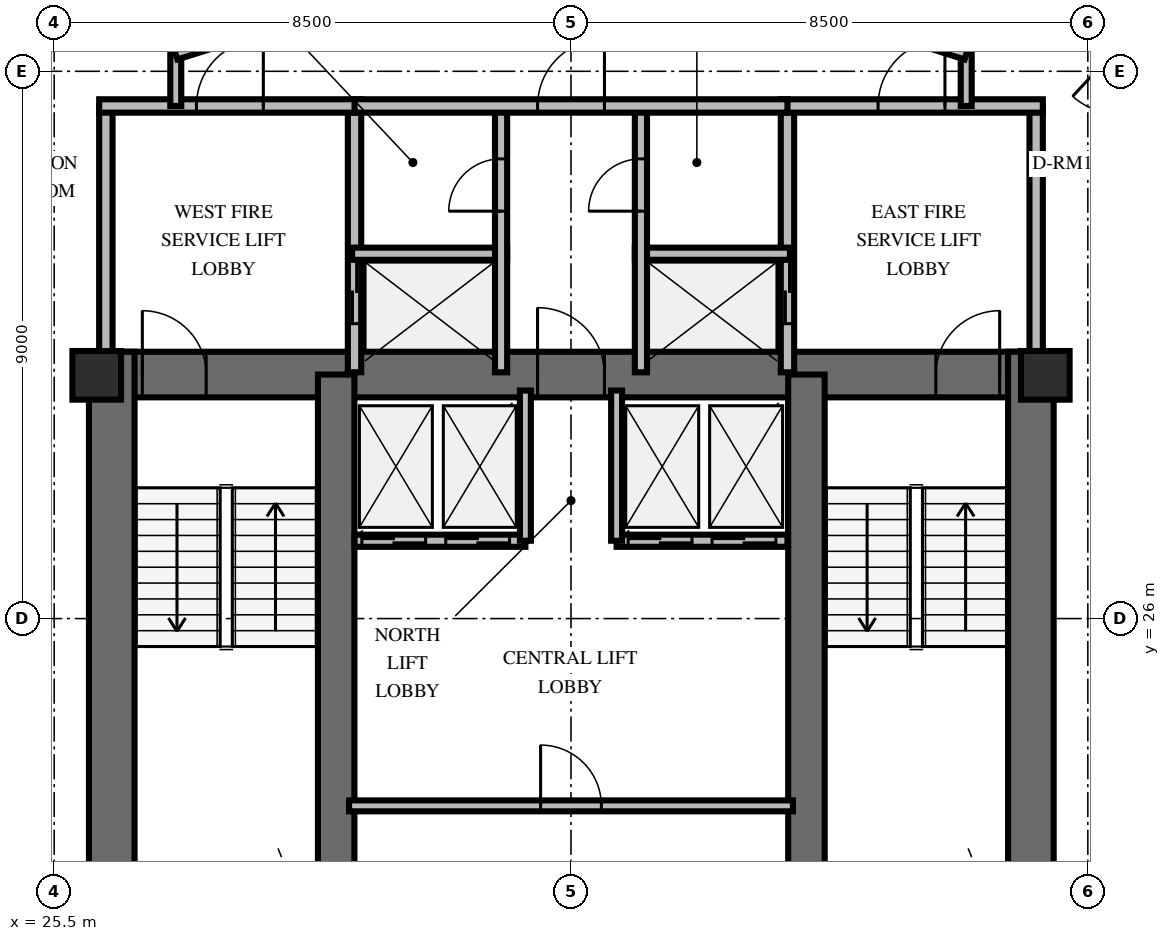
"""IFC4 building model, lengths in metres.
Left out: names, types, materials, properties, quantities, classifications, styles, units other than length and angle.
Written with IfcOpenShell. Run it as: python <this file> out.ifc"""

import sys

from ifc_helpers import new_model, si_unit, direction, frame, frame_2d, origin, origin_2d, place, context, subcontext, project, spatial, rectangle, extrude, element, fill, save


model = new_model("IFC4")
c1 = context("Model", 3, precision=1e-05, world=origin(), true_north=direction((0.0, 1.0)))
c2 = subcontext(c1, "Body", "Model", "MODEL_VIEW")
j1 = project(units=[si_unit("LENGTHUNIT", "METRE"), si_unit("PLANEANGLEUNIT", "RADIAN")], contexts=[c1])
p1 = place(None, origin())
s1 = spatial("IfcSite", under=j1, at=p1, CompositionType="ELEMENT")
p2 = place(p1, origin())
s2 = spatial("IfcBuilding", under=s1, at=p2, CompositionType="ELEMENT")
p3 = place(p2, frame((0.0, 0.0, 184.4)))
s3 = spatial("IfcBuildingStorey", under=s2, at=p3, CompositionType="ELEMENT", Elevation=184.4)
p4 = place(p3, frame((26.072, 30.013, 0.0), z_axis=(0.0, 0.0, 1.0), x_axis=(1.0, 0.0, 0.0)))
e1 = element("IfcWall", 1, at=p4, inside=s3, PredefinedType="SHEAR", context=c2, shape_type="SweptSolid", body=[
    extrude(rectangle(XDim=15.866, YDim=0.75, at=frame_2d((7.933, 0.0))), origin(), (0.0, 0.0, 1.0), 3.6),
])
p5 = place(p4, frame((0.878, 0.0, 0.0)))
e2 = element("IfcOpeningElement", 2, at=p5, cuts=e1, PredefinedType="OPENING", context=c2, shape_type="SweptSolid", body=[
    extrude(rectangle(XDim=1.05, YDim=2.15, at=frame_2d((0.525, 1.075))), frame((0.0, 0.385, 0.0), z_axis=(0.0, -1.0, 0.0), x_axis=(1.0, 0.0, 0.0)), (0.0, 0.0, 1.0), 0.77),
])
p6 = place(p4, frame((13.928, 0.0, 0.0)))
e3 = element("IfcOpeningElement", 3, at=p6, cuts=e1, PredefinedType="OPENING", context=c2, shape_type="SweptSolid", body=[
    extrude(rectangle(XDim=1.05, YDim=2.15, at=frame_2d((0.525, 1.075))), frame((0.0, 0.385, 0.0), z_axis=(0.0, -1.0, 0.0), x_axis=(1.0, 0.0, 0.0)), (0.0, 0.0, 1.0), 0.77),
])
p7 = place(p4, frame((7.378, 0.0, 0.0)))
e4 = element("IfcOpeningElement", 4, at=p7, cuts=e1, PredefinedType="OPENING", context=c2, shape_type="SweptSolid", body=[
    extrude(rectangle(XDim=1.1, YDim=2.15, at=frame_2d((0.55, 1.075))), frame((0.0, 0.385, 0.0), z_axis=(0.0, -1.0, 0.0), x_axis=(1.0, 0.0, 0.0)), (0.0, 0.0, 1.0), 0.77),
])
for number, where, z_axis, x_axis in (
    (5, (26.447, 19.812, 0.0), (0.0, 0.0, 1.0), (0.0, 1.0, 0.0)),
    (6, (41.563, 19.812, 0.0), (0.0, 0.0, 1.0), (0.0, 1.0, 0.0)),
):
    element("IfcWall", number, at=place(p3, frame(where, z_axis=z_axis, x_axis=x_axis)), inside=s3, PredefinedType="SHEAR", context=c2, shape_type="SweptSolid", body=[
        extrude(rectangle(XDim=10.576, YDim=0.75, at=frame_2d((5.288, 0.0))), origin(), (0.0, 0.0, 1.0), 3.6),
    ])
for number, where, z_axis, x_axis in (
    (7, (30.138, 20.187, 0.0), (0.0, 0.0, 1.0), (0.0, 1.0, 0.0)),
    (8, (37.872, 20.187, 0.0), (0.0, 0.0, 1.0), (0.0, 1.0, 0.0)),
):
    element("IfcWall", number, at=place(p3, frame(where, z_axis=z_axis, x_axis=x_axis)), inside=s3, PredefinedType="SHEAR", context=c2, shape_type="SweptSolid", body=[
        extrude(rectangle(XDim=9.826, YDim=0.6, at=frame_2d((4.913, 0.0))), origin(), (0.0, 0.0, 1.0), 3.6),
    ])
for number, where, z_axis, x_axis in (
    (9, (26.2, 30.0, 0.0), (0.0, 0.0, 1.0), (1.0, 0.0, 0.0)),
    (10, (41.8, 30.0, 0.0), (0.0, 0.0, 1.0), (1.0, 0.0, 0.0)),
):
    element("IfcColumn", number, at=place(p3, frame(where, z_axis=z_axis, x_axis=x_axis)), inside=s3, PredefinedType="PILASTER", context=c2, shape_type="SweptSolid", body=[
        extrude(rectangle(XDim=0.8, YDim=0.8, at=origin_2d()), origin(), (0.0, 0.0, 1.0), 3.6),
    ])
p8 = place(p3, frame((26.35, 30.05, 0.0), z_axis=(0.0, 0.0, 1.0), x_axis=(0.0, 1.0, 0.0)))
e11 = element("IfcWall", 11, at=p8, inside=s3, PredefinedType="SOLIDWALL", context=c2, shape_type="SweptSolid", body=[
    extrude(rectangle(XDim=4.38, YDim=0.22, at=frame_2d((2.19, 0.0))), origin(), (0.0, 0.0, 1.0), 2.46),
])
p9 = place(p3, frame((30.44, 30.05, 0.0), z_axis=(0.0, 0.0, 1.0), x_axis=(0.0, 1.0, 0.0)))
e12 = element("IfcWall", 12, at=p9, inside=s3, PredefinedType="SOLIDWALL", context=c2, shape_type="SweptSolid", body=[
    extrude(rectangle(XDim=4.38, YDim=0.22, at=frame_2d((2.19, 0.0))), origin(), (0.0, 0.0, 1.0), 2.46),
])
p10 = place(p9, frame((0.8, 0.0, 0.0)))
e13 = element("IfcOpeningElement", 13, at=p10, cuts=e12, PredefinedType="OPENING", context=c2, shape_type="SweptSolid", body=[
    extrude(rectangle(XDim=1.05, YDim=2.1, at=frame_2d((0.525, 1.05))), frame((0.0, 0.12, 0.0), z_axis=(0.0, -1.0, 0.0), x_axis=(1.0, 0.0, 0.0)), (0.0, 0.0, 1.0), 0.24),
])
p11 = place(p3, frame((26.24, 34.43, 0.0), z_axis=(0.0, 0.0, 1.0), x_axis=(1.0, 0.0, 0.0)))
e14 = element("IfcWall", 14, at=p11, inside=s3, PredefinedType="SOLIDWALL", context=c2, shape_type="SweptSolid", body=[
    extrude(rectangle(XDim=4.31, YDim=0.22, at=frame_2d((2.155, 0.0))), origin(), (0.0, 0.0, 1.0), 2.46),
])
p12 = place(p11, frame((1.6, 0.0, 0.0)))
e15 = element("IfcOpeningElement", 15, at=p12, cuts=e14, PredefinedType="OPENING", context=c2, shape_type="SweptSolid", body=[
    extrude(rectangle(XDim=1.1, YDim=2.15, at=frame_2d((0.55, 1.075))), frame((0.0, 0.12, 0.0), z_axis=(0.0, -1.0, 0.0), x_axis=(1.0, 0.0, 0.0)), (0.0, 0.0, 1.0), 0.24),
])
p13 = place(p3, frame((30.4, 32.0, 0.0), z_axis=(0.0, 0.0, 1.0), x_axis=(1.0, 0.0, 0.0)))
e16 = element("IfcWall", 16, at=p13, inside=s3, PredefinedType="SOLIDWALL", context=c2, shape_type="SweptSolid", body=[
    extrude(rectangle(XDim=2.55, YDim=0.2, at=frame_2d((1.275, 0.0))), origin(), (0.0, 0.0, 1.0), 2.46),
])
p14 = place(p3, frame((32.85, 30.05, 0.0), z_axis=(0.0, 0.0, 1.0), x_axis=(0.0, 1.0, 0.0)))
e17 = element("IfcWall", 17, at=p14, inside=s3, PredefinedType="SOLIDWALL", context=c2, shape_type="SweptSolid", body=[
    extrude(rectangle(XDim=4.38, YDim=0.2, at=frame_2d((2.19, 0.0))), origin(), (0.0, 0.0, 1.0), 2.46),
])
p15 = place(p14, frame((2.65, 0.0, 0.0)))
e18 = element("IfcOpeningElement", 18, at=p15, cuts=e17, PredefinedType="OPENING", context=c2, shape_type="SweptSolid", body=[
    extrude(rectangle(XDim=0.86, YDim=2.05, at=frame_2d((0.43, 1.025))), frame((0.0, 0.11, 0.0), z_axis=(0.0, -1.0, 0.0), x_axis=(1.0, 0.0, 0.0)), (0.0, 0.0, 1.0), 0.22),
])
p16 = place(p3, frame((37.56, 30.05, 0.0), z_axis=(0.0, 0.0, 1.0), x_axis=(0.0, 1.0, 0.0)))
e19 = element("IfcWall", 19, at=p16, inside=s3, PredefinedType="SOLIDWALL", context=c2, shape_type="SweptSolid", body=[
    extrude(rectangle(XDim=4.38, YDim=0.22, at=frame_2d((2.19, 0.0))), origin(), (0.0, 0.0, 1.0), 2.46),
])
p17 = place(p16, frame((0.8, 0.0, 0.0)))
e20 = element("IfcOpeningElement", 20, at=p17, cuts=e19, PredefinedType="OPENING", context=c2, shape_type="SweptSolid", body=[
    extrude(rectangle(XDim=1.05, YDim=2.1, at=frame_2d((0.525, 1.05))), frame((0.0, 0.12, 0.0), z_axis=(0.0, -1.0, 0.0), x_axis=(1.0, 0.0, 0.0)), (0.0, 0.0, 1.0), 0.24),
])
p18 = place(p3, frame((41.65, 30.05, 0.0), z_axis=(0.0, 0.0, 1.0), x_axis=(0.0, 1.0, 0.0)))
e21 = element("IfcWall", 21, at=p18, inside=s3, PredefinedType="SOLIDWALL", context=c2, shape_type="SweptSolid", body=[
    extrude(rectangle(XDim=4.38, YDim=0.22, at=frame_2d((2.19, 0.0))), origin(), (0.0, 0.0, 1.0), 2.46),
])
p19 = place(p3, frame((37.45, 34.43, 0.0), z_axis=(0.0, 0.0, 1.0), x_axis=(1.0, 0.0, 0.0)))
e22 = element("IfcWall", 22, at=p19, inside=s3, PredefinedType="SOLIDWALL", context=c2, shape_type="SweptSolid", body=[
    extrude(rectangle(XDim=4.31, YDim=0.22, at=frame_2d((2.155, 0.0))), origin(), (0.0, 0.0, 1.0), 2.46),
])
p20 = place(p19, frame((1.6, 0.0, 0.0)))
e23 = element("IfcOpeningElement", 23, at=p20, cuts=e22, PredefinedType="OPENING", context=c2, shape_type="SweptSolid", body=[
    extrude(rectangle(XDim=1.1, YDim=2.15, at=frame_2d((0.55, 1.075))), frame((0.0, 0.12, 0.0), z_axis=(0.0, -1.0, 0.0), x_axis=(1.0, 0.0, 0.0)), (0.0, 0.0, 1.0), 0.24),
])
p21 = place(p3, frame((35.05, 32.0, 0.0), z_axis=(0.0, 0.0, 1.0), x_axis=(1.0, 0.0, 0.0)))
e24 = element("IfcWall", 24, at=p21, inside=s3, PredefinedType="SOLIDWALL", context=c2, shape_type="SweptSolid", body=[
    extrude(rectangle(XDim=2.55, YDim=0.2, at=frame_2d((1.275, 0.0))), origin(), (0.0, 0.0, 1.0), 2.46),
])
p22 = place(p3, frame((35.15, 30.05, 0.0), z_axis=(0.0, 0.0, 1.0), x_axis=(0.0, 1.0, 0.0)))
e25 = element("IfcWall", 25, at=p22, inside=s3, PredefinedType="SOLIDWALL", context=c2, shape_type="SweptSolid", body=[
    extrude(rectangle(XDim=4.38, YDim=0.2, at=frame_2d((2.19, 0.0))), origin(), (0.0, 0.0, 1.0), 2.46),
])
p23 = place(p22, frame((2.65, 0.0, 0.0)))
e26 = element("IfcOpeningElement", 26, at=p23, cuts=e25, PredefinedType="OPENING", context=c2, shape_type="SweptSolid", body=[
    extrude(rectangle(XDim=0.86, YDim=2.05, at=frame_2d((0.43, 1.025))), frame((0.0, 0.11, 0.0), z_axis=(0.0, -1.0, 0.0), x_axis=(1.0, 0.0, 0.0)), (0.0, 0.0, 1.0), 0.22),
])
p24 = place(p3, frame((30.44, 34.43, 0.0), z_axis=(0.0, 0.0, 1.0), x_axis=(1.0, 0.0, 0.0)))
e27 = element("IfcWall", 27, at=p24, inside=s3, PredefinedType="SOLIDWALL", context=c2, shape_type="SweptSolid", body=[
    extrude(rectangle(XDim=7.12, YDim=0.22, at=frame_2d((3.56, 0.0))), origin(), (0.0, 0.0, 1.0), 2.46),
])
p25 = place(p24, frame((3.01, 0.0, 0.0)))
e28 = element("IfcOpeningElement", 28, at=p25, cuts=e27, PredefinedType="OPENING", context=c2, shape_type="SweptSolid", body=[
    extrude(rectangle(XDim=1.1, YDim=2.15, at=frame_2d((0.55, 1.075))), frame((0.0, 0.12, 0.0), z_axis=(0.0, -1.0, 0.0), x_axis=(1.0, 0.0, 0.0)), (0.0, 0.0, 1.0), 0.24),
])
p26 = place(p3, frame((30.35, 22.92, 0.0), z_axis=(0.0, 0.0, 1.0), x_axis=(1.0, 0.0, 0.0)))
e29 = element("IfcWall", 29, at=p26, inside=s3, PredefinedType="PARTITIONING", context=c2, shape_type="SweptSolid", body=[
    extrude(rectangle(XDim=7.3, YDim=0.18, at=frame_2d((3.65, 0.0))), origin(), (0.0, 0.0, 1.0), 2.46),
])
p27 = place(p26, frame((3.15, 0.0, 0.0)))
e30 = element("IfcOpeningElement", 30, at=p27, cuts=e29, PredefinedType="OPENING", context=c2, shape_type="SweptSolid", body=[
    extrude(rectangle(XDim=1.0, YDim=2.15, at=frame_2d((0.5, 1.075))), frame((0.0, 0.1, 0.0), z_axis=(0.0, -1.0, 0.0), x_axis=(1.0, 0.0, 0.0)), (0.0, 0.0, 1.0), 0.2),
])
p28 = place(p3, frame((30.44, 27.28, 0.0), z_axis=(0.0, 0.0, 1.0), x_axis=(1.0, 0.0, 0.0)))
e31 = element("IfcWall", 31, at=p28, inside=s3, PredefinedType="SOLIDWALL", context=c2, shape_type="SweptSolid", body=[
    extrude(rectangle(XDim=2.81, YDim=0.2, at=frame_2d((1.405, 0.0))), origin(), (0.0, 0.0, 1.0), 2.46),
])
p29 = place(p28, frame((0.12, 0.0, 0.0)))
e32 = element("IfcOpeningElement", 32, at=p29, cuts=e31, PredefinedType="OPENING", context=c2, shape_type="SweptSolid", body=[
    extrude(rectangle(XDim=1.05, YDim=2.1, at=frame_2d((0.525, 1.05))), frame((0.0, 0.11, 0.0), z_axis=(0.0, -1.0, 0.0), x_axis=(1.0, 0.0, 0.0)), (0.0, 0.0, 1.0), 0.22),
])
p30 = place(p28, frame((1.5, 0.0, 0.0)))
e33 = element("IfcOpeningElement", 33, at=p30, cuts=e31, PredefinedType="OPENING", context=c2, shape_type="SweptSolid", body=[
    extrude(rectangle(XDim=1.05, YDim=2.1, at=frame_2d((0.525, 1.05))), frame((0.0, 0.11, 0.0), z_axis=(0.0, -1.0, 0.0), x_axis=(1.0, 0.0, 0.0)), (0.0, 0.0, 1.0), 0.22),
])
p31 = place(p3, frame((33.25, 27.28, 0.0), z_axis=(0.0, 0.0, 1.0), x_axis=(0.0, 1.0, 0.0)))
e34 = element("IfcWall", 34, at=p31, inside=s3, PredefinedType="SOLIDWALL", context=c2, shape_type="SweptSolid", body=[
    extrude(rectangle(XDim=2.47, YDim=0.18, at=frame_2d((1.235, 0.0))), origin(), (0.0, 0.0, 1.0), 2.46),
])
p32 = place(p3, frame((34.75, 27.28, 0.0), z_axis=(0.0, 0.0, 1.0), x_axis=(1.0, 0.0, 0.0)))
e35 = element("IfcWall", 35, at=p32, inside=s3, PredefinedType="SOLIDWALL", context=c2, shape_type="SweptSolid", body=[
    extrude(rectangle(XDim=2.81, YDim=0.2, at=frame_2d((1.405, 0.0))), origin(), (0.0, 0.0, 1.0), 2.46),
])
p33 = place(p32, frame((0.19, 0.0, 0.0)))
e36 = element("IfcOpeningElement", 36, at=p33, cuts=e35, PredefinedType="OPENING", context=c2, shape_type="SweptSolid", body=[
    extrude(rectangle(XDim=1.05, YDim=2.1, at=frame_2d((0.525, 1.05))), frame((0.0, 0.11, 0.0), z_axis=(0.0, -1.0, 0.0), x_axis=(1.0, 0.0, 0.0)), (0.0, 0.0, 1.0), 0.22),
])
p34 = place(p32, frame((1.57, 0.0, 0.0)))
e37 = element("IfcOpeningElement", 37, at=p34, cuts=e35, PredefinedType="OPENING", context=c2, shape_type="SweptSolid", body=[
    extrude(rectangle(XDim=1.05, YDim=2.1, at=frame_2d((0.525, 1.05))), frame((0.0, 0.11, 0.0), z_axis=(0.0, -1.0, 0.0), x_axis=(1.0, 0.0, 0.0)), (0.0, 0.0, 1.0), 0.22),
])
p35 = place(p3, frame((34.75, 27.28, 0.0), z_axis=(0.0, 0.0, 1.0), x_axis=(0.0, 1.0, 0.0)))
e38 = element("IfcWall", 38, at=p35, inside=s3, PredefinedType="SOLIDWALL", context=c2, shape_type="SweptSolid", body=[
    extrude(rectangle(XDim=2.47, YDim=0.18, at=frame_2d((1.235, 0.0))), origin(), (0.0, 0.0, 1.0), 2.46),
])
for number, where, z_axis, x_axis in (
    (39, (27.5, 34.43, 0.0), (0.0, 0.0, 1.0), (0.0, 1.0, 0.0)),
    (40, (40.5, 35.28, 0.0), (0.0, 0.0, 1.0), (0.0, -1.0, 0.0)),
):
    element("IfcWall", number, at=place(p3, frame(where, z_axis=z_axis, x_axis=x_axis)), inside=s3, PredefinedType="PARTITIONING", context=c2, shape_type="SweptSolid", body=[
        extrude(rectangle(XDim=0.85, YDim=0.18, at=frame_2d((0.425, 0.0))), origin(), (0.0, 0.0, 1.0), 2.46),
    ])
p36 = place(p3, frame((27.5, 35.28, 0.0), z_axis=(0.0, 0.0, 1.0), x_axis=(0.953691418528, 0.300786765376, 0.0)))
e41 = element("IfcWall", 41, at=p36, inside=s3, PredefinedType="PARTITIONING", context=c2, shape_type="SweptSolid", body=[
    extrude(rectangle(XDim=6.816, YDim=0.18, at=frame_2d((3.408, 0.0))), origin(), (0.0, 0.0, 1.0), 2.46),
])
p37 = place(p36, frame((2.858, 0.0, 0.0)))
e42 = element("IfcOpeningElement", 42, at=p37, cuts=e41, PredefinedType="OPENING", context=c2, shape_type="SweptSolid", body=[
    extrude(rectangle(XDim=1.1, YDim=2.15, at=frame_2d((0.55, 1.075))), frame((0.0, 0.1, 0.0), z_axis=(0.0, -1.0, 0.0), x_axis=(1.0, 0.0, 0.0)), (0.0, 0.0, 1.0), 0.2),
])
p38 = place(p3, frame((34.0, 37.33, 0.0), z_axis=(0.0, 0.0, 1.0), x_axis=(0.953691418528, -0.300786765376, 0.0)))
e43 = element("IfcWall", 43, at=p38, inside=s3, PredefinedType="PARTITIONING", context=c2, shape_type="SweptSolid", body=[
    extrude(rectangle(XDim=6.816, YDim=0.18, at=frame_2d((3.408, 0.0))), origin(), (0.0, 0.0, 1.0), 2.46),
])
p39 = place(p38, frame((2.858, 0.0, 0.0)))
e44 = element("IfcOpeningElement", 44, at=p39, cuts=e43, PredefinedType="OPENING", context=c2, shape_type="SweptSolid", body=[
    extrude(rectangle(XDim=1.1, YDim=2.15, at=frame_2d((0.55, 1.075))), frame((0.0, 0.1, 0.0), z_axis=(0.0, -1.0, 0.0), x_axis=(1.0, 0.0, 0.0)), (0.0, 0.0, 1.0), 0.2),
])
p40 = place(p3, frame((44.285, 34.065, 0.0), z_axis=(0.0, 0.0, 1.0), x_axis=(-0.73251486361, 0.680751037157, 0.0)))
e45 = element("IfcWall", 45, at=p40, inside=s3, PredefinedType="PARTITIONING", context=c2, shape_type="SweptSolid", body=[
    extrude(rectangle(XDim=4.089, YDim=0.18, at=frame_2d((2.044, 0.0))), origin(), (0.0, 0.0, 1.0), 2.46),
])
p41 = place(p40, frame((0.847, 0.0, 0.0)))
e46 = element("IfcOpeningElement", 46, at=p41, cuts=e45, PredefinedType="OPENING", context=c2, shape_type="SweptSolid", body=[
    extrude(rectangle(XDim=1.0, YDim=2.15, at=frame_2d((0.5, 1.075))), frame((0.0, 0.1, 0.0), z_axis=(0.0, -1.0, 0.0), x_axis=(1.0, 0.0, 0.0)), (0.0, 0.0, 1.0), 0.2),
])
p42 = place(p3, frame((28.25, 37.737, 0.0), z_axis=(0.0, 0.0, 1.0), x_axis=(-0.807970187932, -0.589223366316, 0.0)))
e47 = element("IfcWall", 47, at=p42, inside=s3, PredefinedType="PARTITIONING", context=c2, shape_type="SweptSolid", body=[
    extrude(rectangle(XDim=4.539, YDim=0.18, at=frame_2d((2.27, 0.0))), origin(), (0.0, 0.0, 1.0), 2.46),
])
p43 = place(p5, origin())
e48 = element("IfcDoor", 48, at=p43, inside=s3, OperationType="SINGLE_SWING_LEFT", PredefinedType="DOOR", context=c2, shape_type="SweptSolid", body=[
    extrude(rectangle(XDim=1.05, YDim=2.15, at=frame_2d((0.525, 1.075))), frame((0.0, 0.025, 0.0), z_axis=(0.0, -1.0, 0.0), x_axis=(1.0, 0.0, 0.0)), (0.0, 0.0, 1.0), 0.05),
])
fill(e2, e48)
p44 = place(p6, origin())
e49 = element("IfcDoor", 49, at=p44, inside=s3, OperationType="SINGLE_SWING_RIGHT", PredefinedType="DOOR", context=c2, shape_type="SweptSolid", body=[
    extrude(rectangle(XDim=1.05, YDim=2.15, at=frame_2d((0.525, 1.075))), frame((0.0, 0.025, 0.0), z_axis=(0.0, -1.0, 0.0), x_axis=(1.0, 0.0, 0.0)), (0.0, 0.0, 1.0), 0.05),
])
fill(e3, e49)
p45 = place(p7, origin())
e50 = element("IfcDoor", 50, at=p45, inside=s3, OperationType="SINGLE_SWING_LEFT", PredefinedType="DOOR", context=c2, shape_type="SweptSolid", body=[
    extrude(rectangle(XDim=1.1, YDim=2.15, at=frame_2d((0.55, 1.075))), frame((0.0, 0.025, 0.0), z_axis=(0.0, -1.0, 0.0), x_axis=(1.0, 0.0, 0.0)), (0.0, 0.0, 1.0), 0.05),
])
fill(e4, e50)
p46 = place(p12, origin())
e51 = element("IfcDoor", 51, at=p46, inside=s3, OperationType="SINGLE_SWING_RIGHT", PredefinedType="DOOR", context=c2, shape_type="SweptSolid", body=[
    extrude(rectangle(XDim=1.1, YDim=2.15, at=frame_2d((0.55, 1.075))), frame((0.0, 0.025, 0.0), z_axis=(0.0, -1.0, 0.0), x_axis=(1.0, 0.0, 0.0)), (0.0, 0.0, 1.0), 0.05),
])
fill(e15, e51)
p47 = place(p10, origin())
e52 = element("IfcDoor", 52, at=p47, inside=s3, OperationType="DOUBLE_DOOR_SLIDING", PredefinedType="USERDEFINED", context=c2, shape_type="SweptSolid", body=[
    extrude(rectangle(XDim=1.05, YDim=2.1, at=frame_2d((0.525, 1.05))), frame((0.0, 0.025, 0.0), z_axis=(0.0, -1.0, 0.0), x_axis=(1.0, 0.0, 0.0)), (0.0, 0.0, 1.0), 0.05),
])
fill(e13, e52)
p48 = place(p15, origin())
e53 = element("IfcDoor", 53, at=p48, inside=s3, OperationType="SINGLE_SWING_LEFT", PredefinedType="TRAPDOOR", context=c2, shape_type="SweptSolid", body=[
    extrude(rectangle(XDim=0.86, YDim=2.05, at=frame_2d((0.43, 1.025))), frame((0.0, 0.025, 0.0), z_axis=(0.0, -1.0, 0.0), x_axis=(1.0, 0.0, 0.0)), (0.0, 0.0, 1.0), 0.05),
])
fill(e18, e53)
p49 = place(p20, origin())
e54 = element("IfcDoor", 54, at=p49, inside=s3, OperationType="SINGLE_SWING_RIGHT", PredefinedType="DOOR", context=c2, shape_type="SweptSolid", body=[
    extrude(rectangle(XDim=1.1, YDim=2.15, at=frame_2d((0.55, 1.075))), frame((0.0, 0.025, 0.0), z_axis=(0.0, -1.0, 0.0), x_axis=(1.0, 0.0, 0.0)), (0.0, 0.0, 1.0), 0.05),
])
fill(e23, e54)
p50 = place(p17, origin())
e55 = element("IfcDoor", 55, at=p50, inside=s3, OperationType="DOUBLE_DOOR_SLIDING", PredefinedType="USERDEFINED", context=c2, shape_type="SweptSolid", body=[
    extrude(rectangle(XDim=1.05, YDim=2.1, at=frame_2d((0.525, 1.05))), frame((0.0, 0.025, 0.0), z_axis=(0.0, -1.0, 0.0), x_axis=(1.0, 0.0, 0.0)), (0.0, 0.0, 1.0), 0.05),
])
fill(e20, e55)
p51 = place(p23, origin())
e56 = element("IfcDoor", 56, at=p51, inside=s3, OperationType="SINGLE_SWING_LEFT", PredefinedType="TRAPDOOR", context=c2, shape_type="SweptSolid", body=[
    extrude(rectangle(XDim=0.86, YDim=2.05, at=frame_2d((0.43, 1.025))), frame((0.0, 0.025, 0.0), z_axis=(0.0, -1.0, 0.0), x_axis=(1.0, 0.0, 0.0)), (0.0, 0.0, 1.0), 0.05),
])
fill(e26, e56)
p52 = place(p25, origin())
e57 = element("IfcDoor", 57, at=p52, inside=s3, OperationType="SINGLE_SWING_RIGHT", PredefinedType="DOOR", context=c2, shape_type="SweptSolid", body=[
    extrude(rectangle(XDim=1.1, YDim=2.15, at=frame_2d((0.55, 1.075))), frame((0.0, 0.025, 0.0), z_axis=(0.0, -1.0, 0.0), x_axis=(1.0, 0.0, 0.0)), (0.0, 0.0, 1.0), 0.05),
])
fill(e28, e57)
p53 = place(p27, origin())
e58 = element("IfcDoor", 58, at=p53, inside=s3, OperationType="SINGLE_SWING_LEFT", PredefinedType="DOOR", context=c2, shape_type="SweptSolid", body=[
    extrude(rectangle(XDim=1.0, YDim=2.15, at=frame_2d((0.5, 1.075))), frame((0.0, 0.025, 0.0), z_axis=(0.0, -1.0, 0.0), x_axis=(1.0, 0.0, 0.0)), (0.0, 0.0, 1.0), 0.05),
])
fill(e30, e58)
p54 = place(p29, origin())
e59 = element("IfcDoor", 59, at=p54, inside=s3, OperationType="DOUBLE_DOOR_SLIDING", PredefinedType="USERDEFINED", context=c2, shape_type="SweptSolid", body=[
    extrude(rectangle(XDim=1.05, YDim=2.1, at=frame_2d((0.525, 1.05))), frame((0.0, 0.025, 0.0), z_axis=(0.0, -1.0, 0.0), x_axis=(1.0, 0.0, 0.0)), (0.0, 0.0, 1.0), 0.05),
])
fill(e32, e59)
p55 = place(p30, origin())
e60 = element("IfcDoor", 60, at=p55, inside=s3, OperationType="DOUBLE_DOOR_SLIDING", PredefinedType="USERDEFINED", context=c2, shape_type="SweptSolid", body=[
    extrude(rectangle(XDim=1.05, YDim=2.1, at=frame_2d((0.525, 1.05))), frame((0.0, 0.025, 0.0), z_axis=(0.0, -1.0, 0.0), x_axis=(1.0, 0.0, 0.0)), (0.0, 0.0, 1.0), 0.05),
])
fill(e33, e60)
p56 = place(p33, origin())
e61 = element("IfcDoor", 61, at=p56, inside=s3, OperationType="DOUBLE_DOOR_SLIDING", PredefinedType="USERDEFINED", context=c2, shape_type="SweptSolid", body=[
    extrude(rectangle(XDim=1.05, YDim=2.1, at=frame_2d((0.525, 1.05))), frame((0.0, 0.025, 0.0), z_axis=(0.0, -1.0, 0.0), x_axis=(1.0, 0.0, 0.0)), (0.0, 0.0, 1.0), 0.05),
])
fill(e36, e61)
p57 = place(p34, origin())
e62 = element("IfcDoor", 62, at=p57, inside=s3, OperationType="DOUBLE_DOOR_SLIDING", PredefinedType="USERDEFINED", context=c2, shape_type="SweptSolid", body=[
    extrude(rectangle(XDim=1.05, YDim=2.1, at=frame_2d((0.525, 1.05))), frame((0.0, 0.025, 0.0), z_axis=(0.0, -1.0, 0.0), x_axis=(1.0, 0.0, 0.0)), (0.0, 0.0, 1.0), 0.05),
])
fill(e37, e62)
save(model, sys.argv[1])
